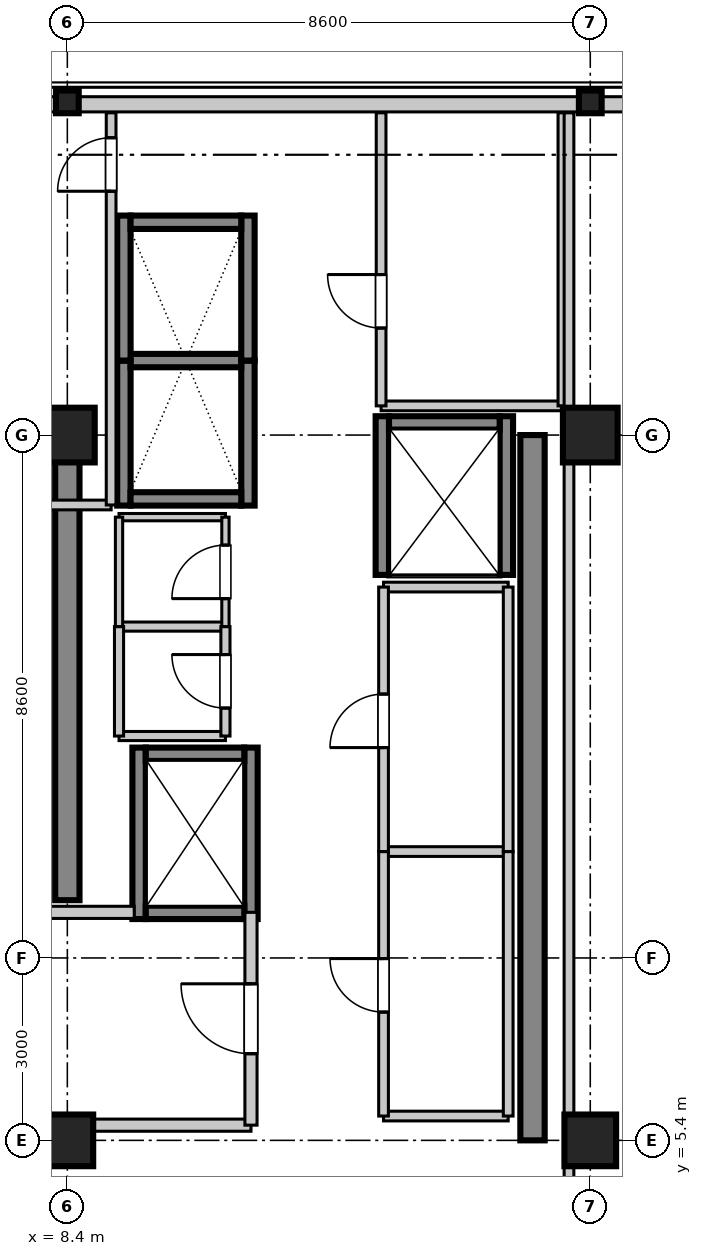
"""IFC4 building model, lengths in metres.
Left out: names, types, materials, properties, quantities, classifications, styles, units other than length and angle.
Written with IfcOpenShell. Run it as: python <this file> out.ifc"""

import sys

from ifc_helpers import new_model, si_unit, direction, frame, frame_2d, origin, origin_2d, place, context, subcontext, project, spatial, rectangle, i_section, extrude, source, transform, mapped, element, fill, save


model = new_model("IFC4")
c1 = context("Model", 3, precision=1e-05, world=origin(), true_north=direction((0.0, 1.0)))
c2 = subcontext(c1, "Body", "Model", "MODEL_VIEW")
j1 = project(units=[si_unit("LENGTHUNIT", "METRE"), si_unit("PLANEANGLEUNIT", "RADIAN")], contexts=[c1])
p1 = place(None, origin())
s1 = spatial("IfcSite", under=j1, at=p1, CompositionType="ELEMENT")
p2 = place(p1, origin())
s2 = spatial("IfcBuilding", under=s1, at=p2, CompositionType="ELEMENT")
p3 = place(p2, frame((0.0, 0.0, 300.35)))
s3 = spatial("IfcBuildingStorey", under=s2, at=p3, CompositionType="ELEMENT", Elevation=300.35)
m1 = source(origin(), c2, "Body", "SweptSolid", [
    extrude(rectangle(XDim=0.85, YDim=0.85, at=origin_2d()), origin(), (0.0, 0.0, 1.0), 3.805),
])
p4 = place(p3, frame((8.4, 5.4, 0.0), z_axis=(0.0, 0.0, 1.0), x_axis=(1.0, 0.0, 0.0)))
e1 = element("IfcColumn", 1, at=p4, inside=s3, PredefinedType="PILASTER", context=c2, shape_type="MappedRepresentation", body=[
    mapped(m1, transform((0.0, 0.0, 0.0), scale=1.0)),
])
m2 = source(origin(), c2, "Body", "SweptSolid", [
    extrude(rectangle(XDim=0.9, YDim=0.9, at=origin_2d()), origin(), (0.0, 0.0, 1.0), 3.805),
])
p5 = place(p3, frame((8.4, 17.0, 0.0), z_axis=(0.0, 0.0, 1.0), x_axis=(1.0, 0.0, 0.0)))
e2 = element("IfcColumn", 2, at=p5, inside=s3, PredefinedType="COLUMN", context=c2, shape_type="MappedRepresentation", body=[
    mapped(m2, transform((0.0, 0.0, 0.0), scale=1.0)),
])
p6 = place(p3, frame((17.0, 5.4, 0.0), z_axis=(0.0, 0.0, 1.0), x_axis=(1.0, 0.0, 0.0)))
e3 = element("IfcColumn", 3, at=p6, inside=s3, PredefinedType="PILASTER", context=c2, shape_type="MappedRepresentation", body=[
    mapped(m1, transform((0.0, 0.0, 0.0), scale=1.0)),
])
p7 = place(p3, frame((17.0, 17.0, 0.0), z_axis=(0.0, 0.0, 1.0), x_axis=(1.0, 0.0, 0.0)))
e4 = element("IfcColumn", 4, at=p7, inside=s3, PredefinedType="COLUMN", context=c2, shape_type="MappedRepresentation", body=[
    mapped(m2, transform((0.0, 0.0, 0.0), scale=1.0)),
])
m3 = source(origin(), c2, "Body", "SweptSolid", [
    extrude(i_section(OverallWidth=0.374, OverallDepth=0.374, WebThickness=0.014, FlangeThickness=0.023, at=origin_2d()), origin(), (0.0, 0.0, 1.0), 3.805),
])
for number, where, z_axis, x_axis in (
    (5, (8.4, 22.48, 0.0), (0.0, 0.0, 1.0), (0.0, 1.0, 0.0)),
    (6, (17.0, 22.48, 0.0), (0.0, 0.0, 1.0), (0.0, 1.0, 0.0)),
):
    element("IfcColumn", number, at=place(p3, frame(where, z_axis=z_axis, x_axis=x_axis)), inside=s3, PredefinedType="COLUMN", context=c2, shape_type="MappedRepresentation", body=[
        mapped(m3, transform((0.0, 0.0, 0.0), scale=1.0)),
    ])
m4 = source(origin(), c2, "Body", "SweptSolid", [
    extrude(rectangle(XDim=7.65, YDim=0.4, at=frame_2d((3.825, 0.0))), origin(), (0.0, 0.0, 1.0), 3.55),
])
p8 = place(p3, frame((8.4, 9.35, 0.0), z_axis=(0.0, 0.0, 1.0), x_axis=(0.0, 1.0, 0.0)))
e7 = element("IfcWall", 7, at=p8, inside=s3, PredefinedType="SHEAR", context=c2, shape_type="MappedRepresentation", body=[
    mapped(m4, transform((0.0, 0.0, 0.0), scale=1.0)),
])
m5 = source(origin(), c2, "Body", "SweptSolid", [
    extrude(rectangle(XDim=11.6, YDim=0.4, at=frame_2d((5.8, 0.0))), origin(), (0.0, 0.0, 1.0), 3.55),
])
p9 = place(p3, frame((16.05, 5.4, 0.0), z_axis=(0.0, 0.0, 1.0), x_axis=(0.0, 1.0, 0.0)))
e8 = element("IfcWall", 8, at=p9, inside=s3, PredefinedType="SHEAR", context=c2, shape_type="MappedRepresentation", body=[
    mapped(m5, transform((0.0, 0.0, 0.0), scale=1.0)),
])
m6 = source(origin(), c2, "Body", "SweptSolid", [
    extrude(rectangle(XDim=2.385, YDim=0.22, at=frame_2d((1.192, 0.0))), origin(), (0.0, 0.0, 1.0), 3.55),
])
for number, where, z_axis, x_axis in (
    (9, (9.33, 15.84, 0.0), (0.0, 0.0, 1.0), (0.0, 1.0, 0.0)),
    (10, (11.37, 15.84, 0.0), (0.0, 0.0, 1.0), (0.0, 1.0, 0.0)),
):
    element("IfcWall", number, at=place(p3, frame(where, z_axis=z_axis, x_axis=x_axis)), inside=s3, PredefinedType="SHEAR", context=c2, shape_type="MappedRepresentation", body=[
        mapped(m6, transform((0.0, 0.0, 0.0), scale=1.0)),
    ])
m7 = source(origin(), c2, "Body", "SweptSolid", [
    extrude(rectangle(XDim=1.82, YDim=0.22, at=frame_2d((0.91, 0.0))), origin(), (0.0, 0.0, 1.0), 3.55),
])
p10 = place(p3, frame((9.44, 15.95, 0.0), z_axis=(0.0, 0.0, 1.0), x_axis=(1.0, 0.0, 0.0)))
e11 = element("IfcWall", 11, at=p10, inside=s3, PredefinedType="SHEAR", context=c2, shape_type="MappedRepresentation", body=[
    mapped(m7, transform((0.0, 0.0, 0.0), scale=1.0)),
])
m8 = source(origin(), c2, "Body", "SweptSolid", [
    extrude(rectangle(XDim=1.82, YDim=0.22, at=frame_2d((0.91, 0.0))), origin(), (0.0, 0.0, 1.0), 3.85),
])
p11 = place(p3, frame((9.44, 18.225, 0.0), z_axis=(0.0, 0.0, 1.0), x_axis=(1.0, 0.0, 0.0)))
e12 = element("IfcWall", 12, at=p11, inside=s3, PredefinedType="SHEAR", context=c2, shape_type="MappedRepresentation", body=[
    mapped(m8, transform((0.0, 0.0, 0.0), scale=1.0)),
])
for number, where, z_axis, x_axis in (
    (13, (9.33, 18.225, 0.0), (0.0, 0.0, 1.0), (0.0, 1.0, 0.0)),
    (14, (11.37, 18.225, 0.0), (0.0, 0.0, 1.0), (0.0, 1.0, 0.0)),
):
    element("IfcWall", number, at=place(p3, frame(where, z_axis=z_axis, x_axis=x_axis)), inside=s3, PredefinedType="SHEAR", context=c2, shape_type="MappedRepresentation", body=[
        mapped(m6, transform((0.0, 0.0, 0.0), scale=1.0)),
    ])
p12 = place(p3, frame((9.44, 20.5, 0.0), z_axis=(0.0, 0.0, 1.0), x_axis=(1.0, 0.0, 0.0)))
e15 = element("IfcWall", 15, at=p12, inside=s3, PredefinedType="SHEAR", context=c2, shape_type="MappedRepresentation", body=[
    mapped(m7, transform((0.0, 0.0, 0.0), scale=1.0)),
])
m9 = source(origin(), c2, "Body", "SweptSolid", [
    extrude(rectangle(XDim=2.82, YDim=0.22, at=frame_2d((1.41, 0.0))), origin(), (0.0, 0.0, 1.0), 3.55),
])
for number, where, z_axis, x_axis in (
    (16, (9.58, 9.04, 0.0), (0.0, 0.0, 1.0), (0.0, 1.0, 0.0)),
    (17, (11.42, 9.04, 0.0), (0.0, 0.0, 1.0), (0.0, 1.0, 0.0)),
):
    element("IfcWall", number, at=place(p3, frame(where, z_axis=z_axis, x_axis=x_axis)), inside=s3, PredefinedType="SHEAR", context=c2, shape_type="MappedRepresentation", body=[
        mapped(m9, transform((0.0, 0.0, 0.0), scale=1.0)),
    ])
m10 = source(origin(), c2, "Body", "SweptSolid", [
    extrude(rectangle(XDim=1.62, YDim=0.22, at=frame_2d((0.81, 0.0))), origin(), (0.0, 0.0, 1.0), 3.55),
])
for number, where, z_axis, x_axis in (
    (18, (9.69, 9.15, 0.0), (0.0, 0.0, 1.0), (1.0, 0.0, 0.0)),
    (19, (9.69, 11.75, 0.0), (0.0, 0.0, 1.0), (1.0, 0.0, 0.0)),
):
    element("IfcWall", number, at=place(p3, frame(where, z_axis=z_axis, x_axis=x_axis)), inside=s3, PredefinedType="SHEAR", context=c2, shape_type="MappedRepresentation", body=[
        mapped(m10, transform((0.0, 0.0, 0.0), scale=1.0)),
    ])
m11 = source(origin(), c2, "Body", "SweptSolid", [
    extrude(rectangle(XDim=2.61, YDim=0.22, at=frame_2d((1.305, 0.0))), origin(), (0.0, 0.0, 1.0), 3.55),
])
for number, where, z_axis, x_axis in (
    (20, (13.58, 14.7, 0.0), (0.0, 0.0, 1.0), (0.0, 1.0, 0.0)),
    (21, (15.62, 14.7, 0.0), (0.0, 0.0, 1.0), (0.0, 1.0, 0.0)),
):
    element("IfcWall", number, at=place(p3, frame(where, z_axis=z_axis, x_axis=x_axis)), inside=s3, PredefinedType="SHEAR", context=c2, shape_type="MappedRepresentation", body=[
        mapped(m11, transform((0.0, 0.0, 0.0), scale=1.0)),
    ])
p13 = place(p3, frame((13.69, 17.2, 0.0), z_axis=(0.0, 0.0, 1.0), x_axis=(1.0, 0.0, 0.0)))
e22 = element("IfcWall", 22, at=p13, inside=s3, PredefinedType="SHEAR", context=c2, shape_type="MappedRepresentation", body=[
    mapped(m7, transform((0.0, 0.0, 0.0), scale=1.0)),
])
m12 = source(origin(), c2, "Body", "SweptSolid", [
    extrude(rectangle(XDim=3.82, YDim=0.2, at=frame_2d((1.91, 0.0))), origin(), (0.0, 0.0, 1.0), 2.89),
])
p14 = place(p3, frame((7.6, 5.65, 0.0), z_axis=(0.0, 0.0, 1.0), x_axis=(1.0, 0.0, 0.0)))
e23 = element("IfcWall", 23, at=p14, inside=s3, PredefinedType="PARTITIONING", context=c2, shape_type="MappedRepresentation", body=[
    mapped(m12, transform((0.0, 0.0, 0.0), scale=1.0)),
])
m13 = source(origin(), c2, "Body", "SweptSolid", [
    extrude(rectangle(XDim=1.9, YDim=0.2, at=frame_2d((0.95, 0.0))), origin(), (0.0, 0.0, 1.0), 2.89),
])
p15 = place(p3, frame((7.6, 9.15, 0.0), z_axis=(0.0, 0.0, 1.0), x_axis=(1.0, 0.0, 0.0)))
e24 = element("IfcWall", 24, at=p15, inside=s3, PredefinedType="PARTITIONING", context=c2, shape_type="MappedRepresentation", body=[
    mapped(m13, transform((0.0, 0.0, 0.0), scale=1.0)),
])
m14 = source(origin(), c2, "Body", "SweptSolid", [
    extrude(rectangle(XDim=3.5, YDim=0.2, at=frame_2d((1.75, 0.0))), origin(), (0.0, 0.0, 1.0), 2.89),
])
p16 = place(p3, frame((11.42, 5.65, 0.0), z_axis=(0.0, 0.0, 1.0), x_axis=(0.0, 1.0, 0.0)))
e25 = element("IfcWall", 25, at=p16, inside=s3, PredefinedType="PARTITIONING", context=c2, shape_type="MappedRepresentation", body=[
    mapped(m14, transform((0.0, 0.0, 0.0), scale=1.0)),
])
p17 = place(p16, frame((1.175, 0.0, 0.0)))
e26 = element("IfcOpeningElement", 26, at=p17, cuts=e25, PredefinedType="OPENING", context=c2, shape_type="SweptSolid", body=[
    extrude(rectangle(XDim=1.15, YDim=2.15, at=frame_2d((0.575, 1.075))), frame((0.0, 0.11, 0.0), z_axis=(0.0, -1.0, 0.0), x_axis=(1.0, 0.0, 0.0)), (0.0, 0.0, 1.0), 0.22),
])
m15 = source(origin(), c2, "Body", "SweptSolid", [
    extrude(rectangle(XDim=1.75, YDim=0.15, at=frame_2d((0.875, 0.0))), origin(), (0.0, 0.0, 1.0), 2.89),
])
for number, where, z_axis, x_axis in (
    (27, (9.25, 12.05, 0.0), (0.0, 0.0, 1.0), (1.0, 0.0, 0.0)),
    (28, (9.25, 13.85, 0.0), (0.0, 0.0, 1.0), (1.0, 0.0, 0.0)),
):
    element("IfcWall", number, at=place(p3, frame(where, z_axis=z_axis, x_axis=x_axis)), inside=s3, PredefinedType="PARTITIONING", context=c2, shape_type="MappedRepresentation", body=[
        mapped(m15, transform((0.0, 0.0, 0.0), scale=1.0)),
    ])
m16 = source(origin(), c2, "Body", "SweptSolid", [
    extrude(rectangle(XDim=1.8, YDim=0.15, at=frame_2d((0.9, 0.0))), origin(), (0.0, 0.0, 1.0), 2.89),
])
p18 = place(p3, frame((9.25, 12.05, 0.0), z_axis=(0.0, 0.0, 1.0), x_axis=(0.0, 1.0, 0.0)))
e29 = element("IfcWall", 29, at=p18, inside=s3, PredefinedType="PARTITIONING", context=c2, shape_type="MappedRepresentation", body=[
    mapped(m16, transform((0.0, 0.0, 0.0), scale=1.0)),
])
p19 = place(p3, frame((11.0, 12.05, 0.0), z_axis=(0.0, 0.0, 1.0), x_axis=(0.0, 1.0, 0.0)))
e30 = element("IfcWall", 30, at=p19, inside=s3, PredefinedType="PARTITIONING", context=c2, shape_type="MappedRepresentation", body=[
    mapped(m16, transform((0.0, 0.0, 0.0), scale=1.0)),
])
p20 = place(p19, frame((0.46, 0.0, 0.0)))
e31 = element("IfcOpeningElement", 31, at=p20, cuts=e30, PredefinedType="OPENING", context=c2, shape_type="SweptSolid", body=[
    extrude(rectangle(XDim=0.88, YDim=2.1, at=frame_2d((0.44, 1.05))), frame((0.0, 0.085, 0.0), z_axis=(0.0, -1.0, 0.0), x_axis=(1.0, 0.0, 0.0)), (0.0, 0.0, 1.0), 0.17),
])
m17 = source(origin(), c2, "Body", "SweptSolid", [
    extrude(rectangle(XDim=1.75, YDim=0.12, at=frame_2d((0.875, 0.0))), origin(), (0.0, 0.0, 1.0), 2.89),
])
p21 = place(p3, frame((9.25, 15.65, 0.0), z_axis=(0.0, 0.0, 1.0), x_axis=(1.0, 0.0, 0.0)))
e32 = element("IfcWall", 32, at=p21, inside=s3, PredefinedType="PARTITIONING", context=c2, shape_type="MappedRepresentation", body=[
    mapped(m17, transform((0.0, 0.0, 0.0), scale=1.0)),
])
m18 = source(origin(), c2, "Body", "SweptSolid", [
    extrude(rectangle(XDim=1.8, YDim=0.12, at=frame_2d((0.9, 0.0))), origin(), (0.0, 0.0, 1.0), 2.89),
])
p22 = place(p3, frame((9.25, 13.85, 0.0), z_axis=(0.0, 0.0, 1.0), x_axis=(0.0, 1.0, 0.0)))
e33 = element("IfcWall", 33, at=p22, inside=s3, PredefinedType="PARTITIONING", context=c2, shape_type="MappedRepresentation", body=[
    mapped(m18, transform((0.0, 0.0, 0.0), scale=1.0)),
])
p23 = place(p3, frame((11.0, 13.85, 0.0), z_axis=(0.0, 0.0, 1.0), x_axis=(0.0, 1.0, 0.0)))
e34 = element("IfcWall", 34, at=p23, inside=s3, PredefinedType="PARTITIONING", context=c2, shape_type="MappedRepresentation", body=[
    mapped(m18, transform((0.0, 0.0, 0.0), scale=1.0)),
])
p24 = place(p23, frame((0.46, 0.0, 0.0)))
e35 = element("IfcOpeningElement", 35, at=p24, cuts=e34, PredefinedType="OPENING", context=c2, shape_type="SweptSolid", body=[
    extrude(rectangle(XDim=0.88, YDim=2.1, at=frame_2d((0.44, 1.05))), frame((0.0, 0.07, 0.0), z_axis=(0.0, -1.0, 0.0), x_axis=(1.0, 0.0, 0.0)), (0.0, 0.0, 1.0), 0.14),
])
m19 = source(origin(), c2, "Body", "SweptSolid", [
    extrude(rectangle(XDim=16.0, YDim=0.25, at=frame_2d((8.0, 0.0))), origin(), (0.0, 0.0, 1.0), 2.89),
])
p25 = place(p3, frame((3.62, 22.44, 0.0), z_axis=(0.0, 0.0, 1.0), x_axis=(1.0, 0.0, 0.0)))
e36 = element("IfcWall", 36, at=p25, inside=s3, PredefinedType="STANDARD", context=c2, shape_type="MappedRepresentation", body=[
    mapped(m19, transform((0.0, 0.0, 0.0), scale=1.0)),
])
m20 = source(origin(), c2, "Body", "SweptSolid", [
    extrude(rectangle(XDim=2.05, YDim=0.16, at=frame_2d((1.025, 0.0))), origin(), (0.0, 0.0, 1.0), 2.89),
])
for number, where, z_axis, x_axis in (
    (37, (13.6, 5.8, 0.0), (0.0, 0.0, 1.0), (1.0, 0.0, 0.0)),
    (38, (13.6, 10.15, 0.0), (0.0, 0.0, 1.0), (1.0, 0.0, 0.0)),
):
    element("IfcWall", number, at=place(p3, frame(where, z_axis=z_axis, x_axis=x_axis)), inside=s3, PredefinedType="PARTITIONING", context=c2, shape_type="MappedRepresentation", body=[
        mapped(m20, transform((0.0, 0.0, 0.0), scale=1.0)),
    ])
m21 = source(origin(), c2, "Body", "SweptSolid", [
    extrude(rectangle(XDim=4.35, YDim=0.16, at=frame_2d((2.175, 0.0))), origin(), (0.0, 0.0, 1.0), 2.89),
])
p26 = place(p3, frame((13.6, 5.8, 0.0), z_axis=(0.0, 0.0, 1.0), x_axis=(0.0, 1.0, 0.0)))
e39 = element("IfcWall", 39, at=p26, inside=s3, PredefinedType="PARTITIONING", context=c2, shape_type="MappedRepresentation", body=[
    mapped(m21, transform((0.0, 0.0, 0.0), scale=1.0)),
])
p27 = place(p26, frame((1.71, 0.0, 0.0)))
e40 = element("IfcOpeningElement", 40, at=p27, cuts=e39, PredefinedType="OPENING", context=c2, shape_type="SweptSolid", body=[
    extrude(rectangle(XDim=0.88, YDim=2.1, at=frame_2d((0.44, 1.05))), frame((0.0, 0.09, 0.0), z_axis=(0.0, -1.0, 0.0), x_axis=(1.0, 0.0, 0.0)), (0.0, 0.0, 1.0), 0.18),
])
p28 = place(p3, frame((15.65, 5.8, 0.0), z_axis=(0.0, 0.0, 1.0), x_axis=(0.0, 1.0, 0.0)))
e41 = element("IfcWall", 41, at=p28, inside=s3, PredefinedType="PARTITIONING", context=c2, shape_type="MappedRepresentation", body=[
    mapped(m21, transform((0.0, 0.0, 0.0), scale=1.0)),
])
p29 = place(p3, frame((13.6, 14.5, 0.0), z_axis=(0.0, 0.0, 1.0), x_axis=(1.0, 0.0, 0.0)))
e42 = element("IfcWall", 42, at=p29, inside=s3, PredefinedType="PARTITIONING", context=c2, shape_type="MappedRepresentation", body=[
    mapped(m20, transform((0.0, 0.0, 0.0), scale=1.0)),
])
m22 = source(origin(), c2, "Body", "SweptSolid", [
    extrude(rectangle(XDim=4.35, YDim=0.16, at=frame_2d((2.175, 0.0))), origin(), (0.0, 0.0, 1.0), 2.89),
])
p30 = place(p3, frame((13.6, 10.15, 0.0), z_axis=(0.0, 0.0, 1.0), x_axis=(0.0, 1.0, 0.0)))
e43 = element("IfcWall", 43, at=p30, inside=s3, PredefinedType="PARTITIONING", context=c2, shape_type="MappedRepresentation", body=[
    mapped(m22, transform((0.0, 0.0, 0.0), scale=1.0)),
])
p31 = place(p30, frame((1.71, 0.0, 0.0)))
e44 = element("IfcOpeningElement", 44, at=p31, cuts=e43, PredefinedType="OPENING", context=c2, shape_type="SweptSolid", body=[
    extrude(rectangle(XDim=0.88, YDim=2.1, at=frame_2d((0.44, 1.05))), frame((0.0, 0.09, 0.0), z_axis=(0.0, -1.0, 0.0), x_axis=(1.0, 0.0, 0.0)), (0.0, 0.0, 1.0), 0.18),
])
p32 = place(p3, frame((15.65, 10.15, 0.0), z_axis=(0.0, 0.0, 1.0), x_axis=(0.0, 1.0, 0.0)))
e45 = element("IfcWall", 45, at=p32, inside=s3, PredefinedType="PARTITIONING", context=c2, shape_type="MappedRepresentation", body=[
    mapped(m22, transform((0.0, 0.0, 0.0), scale=1.0)),
])
m23 = source(origin(), c2, "Body", "SweptSolid", [
    extrude(rectangle(XDim=5.47, YDim=0.16, at=frame_2d((2.735, 0.0))), origin(), (0.0, 0.0, 1.0), 2.89),
])
p33 = place(p3, frame((3.65, 15.85, 0.0), z_axis=(0.0, 0.0, 1.0), x_axis=(1.0, 0.0, 0.0)))
e46 = element("IfcWall", 46, at=p33, inside=s3, PredefinedType="PARTITIONING", context=c2, shape_type="MappedRepresentation", body=[
    mapped(m23, transform((0.0, 0.0, 0.0), scale=1.0)),
])
m24 = source(origin(), c2, "Body", "SweptSolid", [
    extrude(rectangle(XDim=6.45, YDim=0.16, at=frame_2d((3.225, 0.0))), origin(), (0.0, 0.0, 1.0), 2.89),
])
p34 = place(p3, frame((9.12, 15.85, 0.0), z_axis=(0.0, 0.0, 1.0), x_axis=(0.0, 1.0, 0.0)))
e47 = element("IfcWall", 47, at=p34, inside=s3, PredefinedType="PARTITIONING", context=c2, shape_type="MappedRepresentation", body=[
    mapped(m24, transform((0.0, 0.0, 0.0), scale=1.0)),
])
p35 = place(p34, frame((5.16, 0.0, 0.0)))
e48 = element("IfcOpeningElement", 48, at=p35, cuts=e47, PredefinedType="OPENING", context=c2, shape_type="SweptSolid", body=[
    extrude(rectangle(XDim=0.88, YDim=2.1, at=frame_2d((0.44, 1.05))), frame((0.0, 0.09, 0.0), z_axis=(0.0, -1.0, 0.0), x_axis=(1.0, 0.0, 0.0)), (0.0, 0.0, 1.0), 0.18),
])
m25 = source(origin(), c2, "Body", "SweptSolid", [
    extrude(rectangle(XDim=2.99, YDim=0.16, at=frame_2d((1.495, 0.0))), origin(), (0.0, 0.0, 1.0), 2.89),
])
p36 = place(p3, frame((13.56, 17.48, 0.0), z_axis=(0.0, 0.0, 1.0), x_axis=(1.0, 0.0, 0.0)))
e49 = element("IfcWall", 49, at=p36, inside=s3, PredefinedType="PARTITIONING", context=c2, shape_type="MappedRepresentation", body=[
    mapped(m25, transform((0.0, 0.0, 0.0), scale=1.0)),
])
m26 = source(origin(), c2, "Body", "SweptSolid", [
    extrude(rectangle(XDim=4.82, YDim=0.16, at=frame_2d((2.41, 0.0))), origin(), (0.0, 0.0, 1.0), 2.89),
])
p37 = place(p3, frame((13.56, 17.48, 0.0), z_axis=(0.0, 0.0, 1.0), x_axis=(0.0, 1.0, 0.0)))
e50 = element("IfcWall", 50, at=p37, inside=s3, PredefinedType="PARTITIONING", context=c2, shape_type="MappedRepresentation", body=[
    mapped(m26, transform((0.0, 0.0, 0.0), scale=1.0)),
])
p38 = place(p37, frame((1.28, 0.0, 0.0)))
e51 = element("IfcOpeningElement", 51, at=p38, cuts=e50, PredefinedType="OPENING", context=c2, shape_type="SweptSolid", body=[
    extrude(rectangle(XDim=0.88, YDim=2.1, at=frame_2d((0.44, 1.05))), frame((0.0, 0.09, 0.0), z_axis=(0.0, -1.0, 0.0), x_axis=(1.0, 0.0, 0.0)), (0.0, 0.0, 1.0), 0.18),
])
p39 = place(p3, frame((16.55, 17.48, 0.0), z_axis=(0.0, 0.0, 1.0), x_axis=(0.0, 1.0, 0.0)))
e52 = element("IfcWall", 52, at=p39, inside=s3, PredefinedType="PARTITIONING", context=c2, shape_type="MappedRepresentation", body=[
    mapped(m26, transform((0.0, 0.0, 0.0), scale=1.0)),
])
m27 = source(origin(), c2, "Body", "SweptSolid", [
    extrude(rectangle(XDim=17.74, YDim=0.16, at=frame_2d((8.87, 0.0))), origin(), (0.0, 0.0, 1.0), 2.89),
])
p40 = place(p3, frame((16.65, 4.56, 0.0), z_axis=(0.0, 0.0, 1.0), x_axis=(0.0, 1.0, 0.0)))
e53 = element("IfcWall", 53, at=p40, inside=s3, PredefinedType="PARTITIONING", context=c2, shape_type="MappedRepresentation", body=[
    mapped(m27, transform((0.0, 0.0, 0.0), scale=1.0)),
])
m28 = source(origin(), c2, "Body", "SweptSolid", [
    extrude(rectangle(XDim=1.15, YDim=2.15, at=frame_2d((0.575, 1.075))), frame((0.0, 0.025, 0.0), z_axis=(0.0, -1.0, 0.0), x_axis=(1.0, 0.0, 0.0)), (0.0, 0.0, 1.0), 0.05),
])
p41 = place(p17, frame((1.15, 0.0, 0.0), z_axis=(0.0, 0.0, 1.0), x_axis=(-1.0, 0.0, 0.0)))
e54 = element("IfcDoor", 54, at=p41, inside=s3, OperationType="SINGLE_SWING_RIGHT", PredefinedType="DOOR", context=c2, shape_type="MappedRepresentation", body=[
    mapped(m28, transform((0.0, 0.0, 0.0), scale=1.0)),
])
fill(e26, e54)
m29 = source(origin(), c2, "Body", "SweptSolid", [
    extrude(rectangle(XDim=0.88, YDim=2.1, at=frame_2d((0.44, 1.05))), frame((0.0, 0.025, 0.0), z_axis=(0.0, -1.0, 0.0), x_axis=(1.0, 0.0, 0.0)), (0.0, 0.0, 1.0), 0.05),
])
p42 = place(p20, origin())
e55 = element("IfcDoor", 55, at=p42, inside=s3, OperationType="SINGLE_SWING_RIGHT", PredefinedType="DOOR", context=c2, shape_type="MappedRepresentation", body=[
    mapped(m29, transform((0.0, 0.0, 0.0), scale=1.0)),
])
fill(e31, e55)
p43 = place(p24, origin())
e56 = element("IfcDoor", 56, at=p43, inside=s3, OperationType="SINGLE_SWING_LEFT", PredefinedType="DOOR", context=c2, shape_type="MappedRepresentation", body=[
    mapped(m29, transform((0.0, 0.0, 0.0), scale=1.0)),
])
fill(e35, e56)
p44 = place(p27, frame((0.88, 0.0, 0.0), z_axis=(0.0, 0.0, 1.0), x_axis=(-1.0, 0.0, 0.0)))
e57 = element("IfcDoor", 57, at=p44, inside=s3, OperationType="SINGLE_SWING_RIGHT", PredefinedType="DOOR", context=c2, shape_type="MappedRepresentation", body=[
    mapped(m29, transform((0.0, 0.0, 0.0), scale=1.0)),
])
fill(e40, e57)
p45 = place(p31, frame((0.88, 0.0, 0.0), z_axis=(0.0, 0.0, 1.0), x_axis=(-1.0, 0.0, 0.0)))
e58 = element("IfcDoor", 58, at=p45, inside=s3, OperationType="SINGLE_SWING_LEFT", PredefinedType="DOOR", context=c2, shape_type="MappedRepresentation", body=[
    mapped(m29, transform((0.0, 0.0, 0.0), scale=1.0)),
])
fill(e44, e58)
p46 = place(p35, origin())
e59 = element("IfcDoor", 59, at=p46, inside=s3, OperationType="SINGLE_SWING_LEFT", PredefinedType="DOOR", context=c2, shape_type="MappedRepresentation", body=[
    mapped(m29, transform((0.0, 0.0, 0.0), scale=1.0)),
])
fill(e48, e59)
p47 = place(p38, frame((0.88, 0.0, 0.0), z_axis=(0.0, 0.0, 1.0), x_axis=(-1.0, 0.0, 0.0)))
e60 = element("IfcDoor", 60, at=p47, inside=s3, OperationType="SINGLE_SWING_RIGHT", PredefinedType="DOOR", context=c2, shape_type="MappedRepresentation", body=[
    mapped(m29, transform((0.0, 0.0, 0.0), scale=1.0)),
])
fill(e51, e60)
save(model, sys.argv[1])
